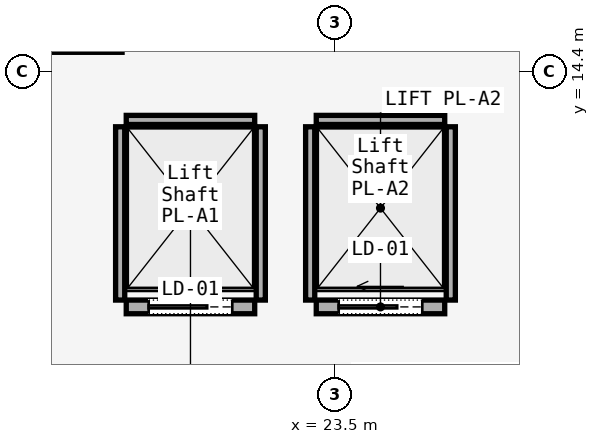
"""IFC4 building model, lengths in metres.
Left out: names, types, materials, properties, quantities, classifications, styles, units other than length and angle.
Written with IfcOpenShell. Run it as: python <this file> out.ifc"""

import sys

from ifc_helpers import new_model, si_unit, direction, frame, frame_2d, origin, place, context, subcontext, project, spatial, rectangle, extrude, element, fill, save


model = new_model("IFC4")
c1 = context("Model", 3, precision=1e-05, world=origin(), true_north=direction((0.0, 1.0)))
c2 = subcontext(c1, "Body", "Model", "MODEL_VIEW")
j1 = project(units=[si_unit("LENGTHUNIT", "METRE"), si_unit("PLANEANGLEUNIT", "RADIAN")], contexts=[c1])
p1 = place(None, origin())
s1 = spatial("IfcSite", under=j1, at=p1, CompositionType="ELEMENT")
p2 = place(p1, origin())
s2 = spatial("IfcBuilding", under=s1, at=p2, CompositionType="ELEMENT")
p3 = place(p2, frame((0.0, 0.0, 18.0)))
s3 = spatial("IfcBuildingStorey", under=s2, at=p3, CompositionType="ELEMENT", Elevation=18.0)
p4 = place(p3, frame((20.755, 11.3, 0.0), z_axis=(0.0, 0.0, 1.0), x_axis=(1.0, 0.0, 0.0)))
e1 = element("IfcWall", 1, at=p4, inside=s3, PredefinedType="SOLIDWALL", context=c2, shape_type="SweptSolid", body=[
    extrude(rectangle(XDim=1.69, YDim=0.18, at=frame_2d((0.845, 0.0))), origin(), (0.0, 0.0, 1.0), 4.47),
])
p5 = place(p4, frame((0.295, 0.0, 0.0)))
e2 = element("IfcOpeningElement", 2, at=p5, cuts=e1, PredefinedType="OPENING", context=c2, shape_type="SweptSolid", body=[
    extrude(rectangle(XDim=1.1, YDim=2.2, at=frame_2d((0.55, 1.1))), frame((0.0, 0.09, 0.0), z_axis=(0.0, -1.0, 0.0), x_axis=(1.0, 0.0, 0.0)), (0.0, 0.0, 1.0), 0.18),
])
p6 = place(p3, frame((20.755, 13.76, 0.0), z_axis=(0.0, 0.0, 1.0), x_axis=(1.0, 0.0, 0.0)))
e3 = element("IfcWall", 3, at=p6, inside=s3, PredefinedType="SOLIDWALL", context=c2, shape_type="SweptSolid", body=[
    extrude(rectangle(XDim=1.69, YDim=0.12, at=frame_2d((0.845, 0.0))), origin(), (0.0, 0.0, 1.0), 4.47),
])
for number, where, z_axis, x_axis in (
    (4, (20.675, 11.39, 0.0), (0.0, 0.0, 1.0), (0.0, 1.0, 0.0)),
    (5, (22.525, 11.39, 0.0), (0.0, 0.0, 1.0), (0.0, 1.0, 0.0)),
):
    element("IfcWall", number, at=place(p3, frame(where, z_axis=z_axis, x_axis=x_axis)), inside=s3, PredefinedType="SOLIDWALL", context=c2, shape_type="SweptSolid", body=[
        extrude(rectangle(XDim=2.28, YDim=0.12, at=frame_2d((1.14, 0.0))), origin(), (0.0, 0.0, 1.0), 4.47),
    ])
p7 = place(p3, frame((23.255, 11.3, 0.0), z_axis=(0.0, 0.0, 1.0), x_axis=(1.0, 0.0, 0.0)))
e6 = element("IfcWall", 6, at=p7, inside=s3, PredefinedType="SOLIDWALL", context=c2, shape_type="SweptSolid", body=[
    extrude(rectangle(XDim=1.69, YDim=0.18, at=frame_2d((0.845, 0.0))), origin(), (0.0, 0.0, 1.0), 4.47),
])
p8 = place(p7, frame((0.295, 0.0, 0.0)))
e7 = element("IfcOpeningElement", 7, at=p8, cuts=e6, PredefinedType="OPENING", context=c2, shape_type="SweptSolid", body=[
    extrude(rectangle(XDim=1.1, YDim=2.2, at=frame_2d((0.55, 1.1))), frame((0.0, 0.09, 0.0), z_axis=(0.0, -1.0, 0.0), x_axis=(1.0, 0.0, 0.0)), (0.0, 0.0, 1.0), 0.18),
])
p9 = place(p3, frame((23.255, 13.76, 0.0), z_axis=(0.0, 0.0, 1.0), x_axis=(1.0, 0.0, 0.0)))
e8 = element("IfcWall", 8, at=p9, inside=s3, PredefinedType="SOLIDWALL", context=c2, shape_type="SweptSolid", body=[
    extrude(rectangle(XDim=1.69, YDim=0.12, at=frame_2d((0.845, 0.0))), origin(), (0.0, 0.0, 1.0), 4.47),
])
for number, where, z_axis, x_axis in (
    (9, (23.175, 11.39, 0.0), (0.0, 0.0, 1.0), (0.0, 1.0, 0.0)),
    (10, (25.025, 11.39, 0.0), (0.0, 0.0, 1.0), (0.0, 1.0, 0.0)),
):
    element("IfcWall", number, at=place(p3, frame(where, z_axis=z_axis, x_axis=x_axis)), inside=s3, PredefinedType="SOLIDWALL", context=c2, shape_type="SweptSolid", body=[
        extrude(rectangle(XDim=2.28, YDim=0.12, at=frame_2d((1.14, 0.0))), origin(), (0.0, 0.0, 1.0), 4.47),
    ])
p10 = place(p5, origin())
e11 = element("IfcDoor", 11, at=p10, inside=s3, OperationType="SLIDING_TO_LEFT", PredefinedType="DOOR", context=c2, shape_type="SweptSolid", body=[
    extrude(rectangle(XDim=1.1, YDim=2.2, at=frame_2d((0.55, 1.1))), frame((0.0, 0.025, 0.0), z_axis=(0.0, -1.0, 0.0), x_axis=(1.0, 0.0, 0.0)), (0.0, 0.0, 1.0), 0.05),
])
fill(e2, e11)
p11 = place(p8, origin())
e12 = element("IfcDoor", 12, at=p11, inside=s3, OperationType="SLIDING_TO_LEFT", PredefinedType="DOOR", context=c2, shape_type="SweptSolid", body=[
    extrude(rectangle(XDim=1.1, YDim=2.2, at=frame_2d((0.55, 1.1))), frame((0.0, 0.025, 0.0), z_axis=(0.0, -1.0, 0.0), x_axis=(1.0, 0.0, 0.0)), (0.0, 0.0, 1.0), 0.05),
])
fill(e7, e12)
save(model, sys.argv[1])
